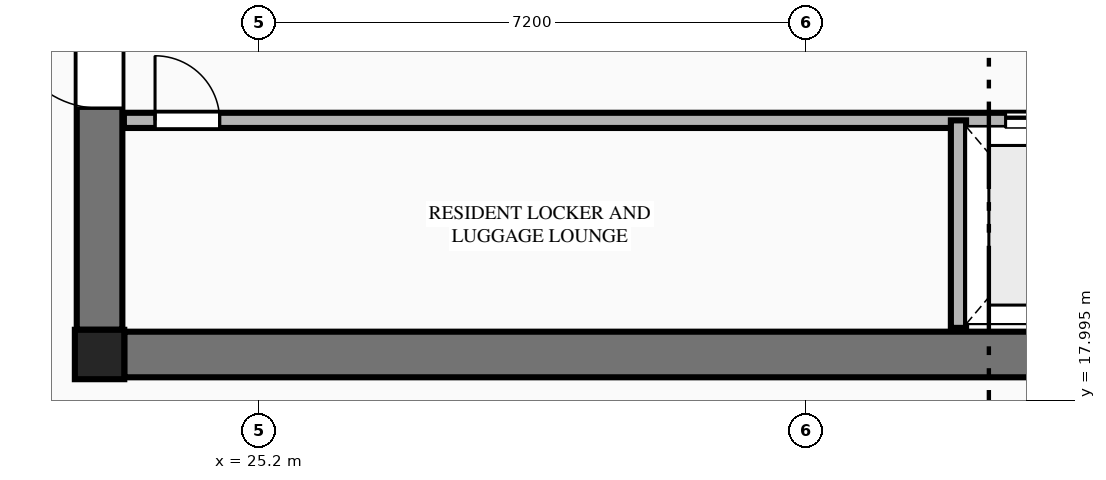
"""IFC4 building model, lengths in metres.
Left out: names, types, materials, properties, quantities, classifications, styles, units other than length and angle.
Written with IfcOpenShell. Run it as: python <this file> out.ifc"""

import sys

from ifc_helpers import new_model, si_unit, direction, frame, frame_2d, origin, origin_2d, place, context, subcontext, project, spatial, rectangle, extrude, element, fill, save


model = new_model("IFC4")
c1 = context("Model", 3, precision=1e-05, world=origin(), true_north=direction((0.0, 1.0)))
c2 = subcontext(c1, "Body", "Model", "MODEL_VIEW")
j1 = project(units=[si_unit("LENGTHUNIT", "METRE"), si_unit("PLANEANGLEUNIT", "RADIAN")], contexts=[c1])
p1 = place(None, origin())
s1 = spatial("IfcSite", under=j1, at=p1, CompositionType="ELEMENT")
p2 = place(p1, origin())
s2 = spatial("IfcBuilding", under=s1, at=p2, CompositionType="ELEMENT")
p3 = place(p2, frame((0.0, 0.0, 167.7)))
s3 = spatial("IfcBuildingStorey", under=s2, at=p3, CompositionType="ELEMENT", Elevation=167.7)
p4 = place(p3, frame((23.1, 18.6, 0.0), z_axis=(0.0, 0.0, 1.0), x_axis=(1.0, 0.0, 0.0)))
e1 = element("IfcColumn", 1, at=p4, inside=s3, PredefinedType="COLUMN", context=c2, shape_type="SweptSolid", body=[
    extrude(rectangle(XDim=0.65, YDim=0.65, at=origin_2d()), origin(), (0.0, 0.0, 1.0), 4.2),
])
p5 = place(p3, frame((23.425, 18.6, 0.0), z_axis=(0.0, 0.0, 1.0), x_axis=(1.0, 0.0, 0.0)))
e2 = element("IfcWall", 2, at=p5, inside=s3, PredefinedType="SHEAR", context=c2, shape_type="SweptSolid", body=[
    extrude(rectangle(XDim=17.95, YDim=0.6, at=frame_2d((8.975, 0.0))), origin(), (0.0, 0.0, 1.0), 4.0),
])
p6 = place(p3, frame((23.1, 18.925, 0.0), z_axis=(0.0, 0.0, 1.0), x_axis=(0.0, 1.0, 0.0)))
e3 = element("IfcWall", 3, at=p6, inside=s3, PredefinedType="SHEAR", context=c2, shape_type="SweptSolid", body=[
    extrude(rectangle(XDim=13.95, YDim=0.6, at=frame_2d((6.975, 0.0))), origin(), (0.0, 0.0, 1.0), 4.0),
])
p7 = place(p6, frame((2.915, 0.0, 0.0)))
e4 = element("IfcOpeningElement", 4, at=p7, cuts=e3, PredefinedType="OPENING", context=c2, shape_type="SweptSolid", body=[
    extrude(rectangle(XDim=1.22, YDim=2.25, at=frame_2d((0.61, 1.125))), frame((0.0, 0.31, 0.0), z_axis=(0.0, -1.0, 0.0), x_axis=(1.0, 0.0, 0.0)), (0.0, 0.0, 1.0), 0.62),
])
p8 = place(p3, frame((23.42, 21.68, 0.0), z_axis=(0.0, 0.0, 1.0), x_axis=(1.0, 0.0, 0.0)))
e5 = element("IfcWall", 5, at=p8, inside=s3, PredefinedType="PLUMBINGWALL", context=c2, shape_type="SweptSolid", body=[
    extrude(rectangle(XDim=17.96, YDim=0.2, at=frame_2d((8.98, 0.0))), origin(), (0.0, 0.0, 1.0), 4.0),
])
p9 = place(p8, frame((11.6, 0.0, 0.0)))
e6 = element("IfcOpeningElement", 6, at=p9, cuts=e5, PredefinedType="OPENING", context=c2, shape_type="SweptSolid", body=[
    extrude(rectangle(XDim=1.1, YDim=2.2, at=frame_2d((0.55, 1.1))), frame((0.0, 0.11, 0.0), z_axis=(0.0, -1.0, 0.0), x_axis=(1.0, 0.0, 0.0)), (0.0, 0.0, 1.0), 0.22),
])
p10 = place(p8, frame((0.41, 0.0, 0.0)))
e7 = element("IfcOpeningElement", 7, at=p10, cuts=e5, PredefinedType="OPENING", context=c2, shape_type="SweptSolid", body=[
    extrude(rectangle(XDim=0.85, YDim=2.05, at=frame_2d((0.425, 1.025))), frame((0.0, 0.11, 0.0), z_axis=(0.0, -1.0, 0.0), x_axis=(1.0, 0.0, 0.0)), (0.0, 0.0, 1.0), 0.22),
])
p11 = place(p8, frame((13.78, 0.0, 0.0)))
e8 = element("IfcOpeningElement", 8, at=p11, cuts=e5, PredefinedType="OPENING", context=c2, shape_type="SweptSolid", body=[
    extrude(rectangle(XDim=0.85, YDim=2.05, at=frame_2d((0.425, 1.025))), frame((0.0, 0.11, 0.0), z_axis=(0.0, -1.0, 0.0), x_axis=(1.0, 0.0, 0.0)), (0.0, 0.0, 1.0), 0.22),
])
p12 = place(p8, frame((16.13, 0.0, 0.0)))
e9 = element("IfcOpeningElement", 9, at=p12, cuts=e5, PredefinedType="OPENING", context=c2, shape_type="SweptSolid", body=[
    extrude(rectangle(XDim=0.85, YDim=2.05, at=frame_2d((0.425, 1.025))), frame((0.0, 0.11, 0.0), z_axis=(0.0, -1.0, 0.0), x_axis=(1.0, 0.0, 0.0)), (0.0, 0.0, 1.0), 0.22),
])
p13 = place(p3, frame((34.4, 18.95, 0.0), z_axis=(0.0, 0.0, 1.0), x_axis=(0.0, 1.0, 0.0)))
e10 = element("IfcWall", 10, at=p13, inside=s3, PredefinedType="PLUMBINGWALL", context=c2, shape_type="SweptSolid", body=[
    extrude(rectangle(XDim=2.73, YDim=0.2, at=frame_2d((1.365, 0.0))), origin(), (0.0, 0.0, 1.0), 4.0),
])
p14 = place(p7, origin())
e11 = element("IfcDoor", 11, at=p14, inside=s3, OperationType="SINGLE_SWING_RIGHT", PredefinedType="DOOR", context=c2, shape_type="SweptSolid", body=[
    extrude(rectangle(XDim=1.22, YDim=2.25, at=frame_2d((0.61, 1.125))), frame((0.0, 0.025, 0.0), z_axis=(0.0, -1.0, 0.0), x_axis=(1.0, 0.0, 0.0)), (0.0, 0.0, 1.0), 0.05),
])
fill(e4, e11)
p15 = place(p9, origin())
e12 = element("IfcDoor", 12, at=p15, inside=s3, OperationType="DOUBLE_DOOR_SLIDING", PredefinedType="DOOR", context=c2, shape_type="SweptSolid", body=[
    extrude(rectangle(XDim=1.1, YDim=2.2, at=frame_2d((0.55, 1.1))), frame((0.0, 0.025, 0.0), z_axis=(0.0, -1.0, 0.0), x_axis=(1.0, 0.0, 0.0)), (0.0, 0.0, 1.0), 0.05),
])
fill(e6, e12)
p16 = place(p10, origin())
e13 = element("IfcDoor", 13, at=p16, inside=s3, OperationType="SINGLE_SWING_LEFT", PredefinedType="DOOR", context=c2, shape_type="SweptSolid", body=[
    extrude(rectangle(XDim=0.85, YDim=2.05, at=frame_2d((0.425, 1.025))), frame((0.0, 0.025, 0.0), z_axis=(0.0, -1.0, 0.0), x_axis=(1.0, 0.0, 0.0)), (0.0, 0.0, 1.0), 0.05),
])
fill(e7, e13)
save(model, sys.argv[1])
